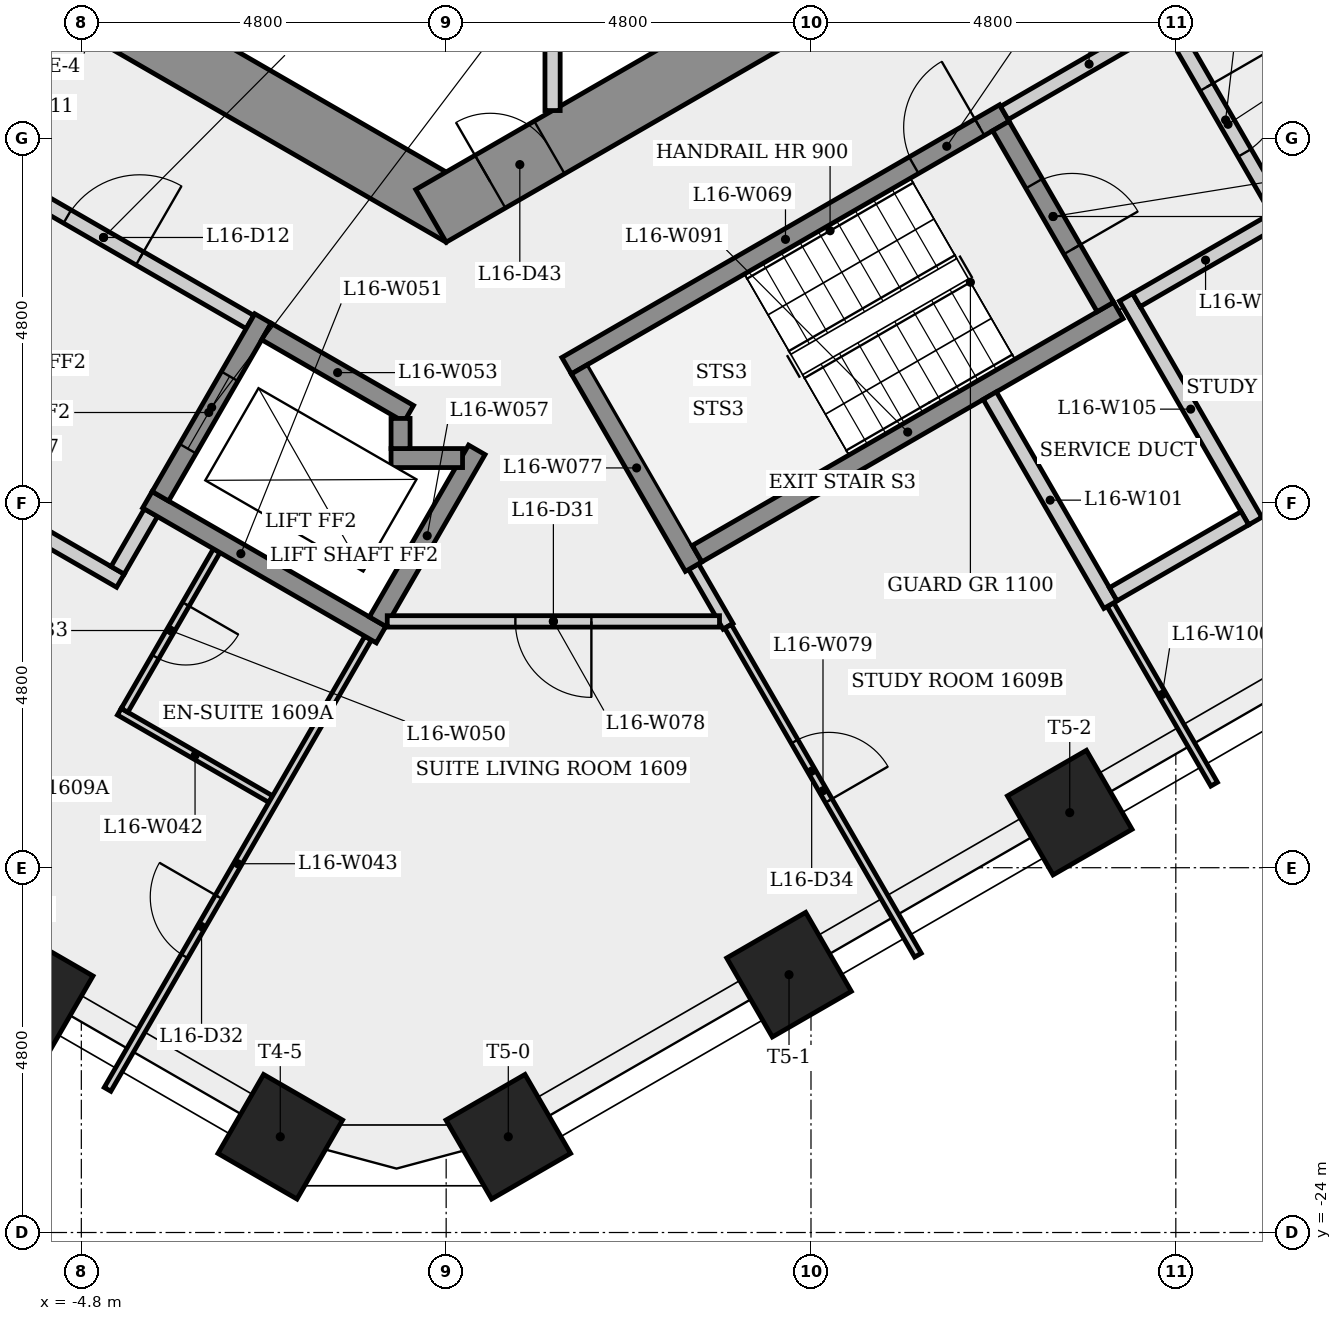
"""IFC4 building model, lengths in metres.
Left out: names, types, materials, properties, quantities, classifications, styles, units other than length and angle.
Written with IfcOpenShell. Run it as: python <this file> out.ifc"""

import sys

from ifc_helpers import new_model, si_unit, direction, frame, frame_2d, origin, origin_2d, place, context, subcontext, project, spatial, rectangle, extrude, element, fill, save


model = new_model("IFC4")
c1 = context("Model", 3, precision=1e-05, world=origin(), true_north=direction((0.0, 1.0)))
c2 = subcontext(c1, "Body", "Model", "MODEL_VIEW")
j1 = project(units=[si_unit("LENGTHUNIT", "METRE"), si_unit("PLANEANGLEUNIT", "RADIAN")], contexts=[c1])
p1 = place(None, origin())
s1 = spatial("IfcSite", under=j1, at=p1, CompositionType="ELEMENT")
p2 = place(p1, origin())
s2 = spatial("IfcBuilding", under=s1, at=p2, CompositionType="ELEMENT")
p3 = place(p2, frame((0.0, 0.0, 62.9)))
s3 = spatial("IfcBuildingStorey", under=s2, at=p3, CompositionType="ELEMENT", Elevation=62.9)
p4 = place(p3, frame((-9.3, -5.138, 0.0), z_axis=(0.0, 0.0, 1.0), x_axis=(0.866023993627, -0.500002442456, 0.0)))
e1 = element("IfcWall", 1, at=p4, inside=s3, PredefinedType="SHEAR", context=c2, shape_type="SweptSolid", body=[
    extrude(rectangle(XDim=10.97, YDim=0.8, at=frame_2d((5.485, 0.0))), origin(), (0.0, 0.0, 1.0), 3.4),
])
p5 = place(p4, frame((0.78, 0.0, 0.0)))
e2 = element("IfcOpeningElement", 2, at=p5, cuts=e1, PredefinedType="OPENING", context=c2, shape_type="SweptSolid", body=[
    extrude(rectangle(XDim=0.9, YDim=2.1, at=frame_2d((0.45, 1.05))), frame((0.0, 0.41, 0.0), z_axis=(0.0, -1.0, 0.0), x_axis=(1.0, 0.0, 0.0)), (0.0, 0.0, 1.0), 0.82),
])
p6 = place(p3, frame((-0.2, -10.623, 0.0), z_axis=(0.0, 0.0, 1.0), x_axis=(0.866023993627, 0.500002442456, 0.0)))
e3 = element("IfcWall", 3, at=p6, inside=s3, PredefinedType="SHEAR", context=c2, shape_type="SweptSolid", body=[
    extrude(rectangle(XDim=10.97, YDim=0.8, at=frame_2d((5.485, 0.0))), origin(), (0.0, 0.0, 1.0), 3.4),
])
p7 = place(p6, frame((0.9, 0.0, 0.0)))
e4 = element("IfcOpeningElement", 4, at=p7, cuts=e3, PredefinedType="OPENING", context=c2, shape_type="SweptSolid", body=[
    extrude(rectangle(XDim=0.9, YDim=2.1, at=frame_2d((0.45, 1.05))), frame((0.0, 0.41, 0.0), z_axis=(0.0, -1.0, 0.0), x_axis=(1.0, 0.0, 0.0)), (0.0, 0.0, 1.0), 0.82),
])
p8 = place(p6, frame((7.455, 0.0, 0.0)))
e5 = element("IfcOpeningElement", 5, at=p8, cuts=e3, PredefinedType="OPENING", context=c2, shape_type="SweptSolid", body=[
    extrude(rectangle(XDim=0.9, YDim=2.1, at=frame_2d((0.45, 1.05))), frame((0.0, 0.41, 0.0), z_axis=(0.0, -1.0, 0.0), x_axis=(1.0, 0.0, 0.0)), (0.0, 0.0, 1.0), 0.82),
])
for number, where, z_axis, x_axis in (
    (6, (-5.466, -20.844, 0.0), (0.0, 0.0, 1.0), (-0.5, -0.866, 0.0)),
    (7, (-2.182, -22.74, 0.0), (0.0, 0.0, 1.0), (-0.5, -0.866, 0.0)),
    (8, (0.818, -22.74, 0.0), (0.0, 0.0, 1.0), (0.5, -0.866, 0.0)),
    (9, (4.511, -20.607, 0.0), (0.0, 0.0, 1.0), (0.5, -0.866, 0.0)),
    (10, (8.204, -18.475, 0.0), (0.0, 0.0, 1.0), (0.5, -0.866, 0.0)),
):
    element("IfcColumn", number, at=place(p3, frame(where, z_axis=z_axis, x_axis=x_axis)), inside=s3, PredefinedType="COLUMN", context=c2, shape_type="SweptSolid", body=[
        extrude(rectangle(XDim=1.2, YDim=1.2, at=origin_2d()), origin(), (0.0, 0.0, 1.0), 3.4),
    ])
p9 = place(p3, frame((-8.356, -13.073, 0.0), z_axis=(0.0, 0.0, 1.0), x_axis=(0.866038532462, -0.499977259774, 0.0)))
e11 = element("IfcWall", 11, at=p9, inside=s3, PredefinedType="PARTITIONING", context=c2, shape_type="SweptSolid", body=[
    extrude(rectangle(XDim=4.7, YDim=0.2, at=frame_2d((2.35, 0.0))), origin(), (0.0, 0.0, 1.0), 3.0),
])
p10 = place(p3, frame((-6.435, -9.795, 0.0), z_axis=(0.0, 0.0, 1.0), x_axis=(0.866012907634, -0.500021643343, 0.0)))
e12 = element("IfcWall", 12, at=p10, inside=s3, PredefinedType="PARTITIONING", context=c2, shape_type="SweptSolid", body=[
    extrude(rectangle(XDim=4.45, YDim=0.2, at=frame_2d((2.225, 0.0))), origin(), (0.0, 0.0, 1.0), 3.0),
])
p11 = place(p10, frame((1.675, 0.0, 0.0)))
e13 = element("IfcOpeningElement", 13, at=p11, cuts=e12, PredefinedType="OPENING", context=c2, shape_type="SweptSolid", body=[
    extrude(rectangle(XDim=1.1, YDim=2.1, at=frame_2d((0.55, 1.05))), frame((0.0, 0.11, 0.0), z_axis=(0.0, -1.0, 0.0), x_axis=(1.0, 0.0, 0.0)), (0.0, 0.0, 1.0), 0.22),
])
p12 = place(p3, frame((-4.3, -17.147, 0.0), z_axis=(0.0, 0.0, 1.0), x_axis=(0.866053019151, -0.499952165731, 0.0)))
e14 = element("IfcWall", 14, at=p12, inside=s3, PredefinedType="PARTITIONING", context=c2, shape_type="SweptSolid", body=[
    extrude(rectangle(XDim=2.3, YDim=0.1, at=frame_2d((1.15, 0.0))), origin(), (0.0, 0.0, 1.0), 3.0),
])
p13 = place(p3, frame((-4.455, -22.116, 0.0), z_axis=(0.0, 0.0, 1.0), x_axis=(0.499984476993, 0.866034365811, 0.0)))
e15 = element("IfcWall", 15, at=p13, inside=s3, PredefinedType="PARTITIONING", context=c2, shape_type="SweptSolid", body=[
    extrude(rectangle(XDim=6.856, YDim=0.1, at=frame_2d((3.428, 0.0))), origin(), (0.0, 0.0, 1.0), 3.0),
])
p14 = place(p13, frame((2.023, 0.0, 0.0)))
e16 = element("IfcOpeningElement", 16, at=p14, cuts=e15, PredefinedType="OPENING", context=c2, shape_type="SweptSolid", body=[
    extrude(rectangle(XDim=0.9, YDim=2.1, at=frame_2d((0.45, 1.05))), frame((0.0, 0.06, 0.0), z_axis=(0.0, -1.0, 0.0), x_axis=(1.0, 0.0, 0.0)), (0.0, 0.0, 1.0), 0.12),
])
p15 = place(p3, frame((-3.885, -14.529, 0.0), z_axis=(0.0, 0.0, 1.0), x_axis=(-0.499859285417, -0.866106630146, 0.0)))
e17 = element("IfcWall", 17, at=p15, inside=s3, PredefinedType="PARTITIONING", context=c2, shape_type="SweptSolid", body=[
    extrude(rectangle(XDim=0.875, YDim=0.2, at=frame_2d((0.438, 0.0))), origin(), (0.0, 0.0, 1.0), 3.0),
])
p16 = place(p3, frame((-3.019, -15.029, 0.0), z_axis=(0.0, 0.0, 1.0), x_axis=(-0.499972286653, -0.866041403502, 0.0)))
e18 = element("IfcWall", 18, at=p16, inside=s3, PredefinedType="PARTITIONING", context=c2, shape_type="SweptSolid", body=[
    extrude(rectangle(XDim=2.425, YDim=0.1, at=frame_2d((1.212, 0.0))), origin(), (0.0, 0.0, 1.0), 3.0),
])
p17 = place(p16, frame((0.812, 0.0, 0.0)))
e19 = element("IfcOpeningElement", 19, at=p17, cuts=e18, PredefinedType="OPENING", context=c2, shape_type="SweptSolid", body=[
    extrude(rectangle(XDim=0.8, YDim=2.1, at=frame_2d((0.4, 1.05))), frame((0.0, 0.06, 0.0), z_axis=(0.0, -1.0, 0.0), x_axis=(1.0, 0.0, 0.0)), (0.0, 0.0, 1.0), 0.12),
])
p18 = place(p3, frame((-3.931, -14.358, 0.0), z_axis=(0.0, 0.0, 1.0), x_axis=(0.8660424351, -0.499970499736, 0.0)))
e20 = element("IfcWall", 20, at=p18, inside=s3, PredefinedType="SHEAR", context=c2, shape_type="SweptSolid", body=[
    extrude(rectangle(XDim=3.55, YDim=0.25, at=frame_2d((1.775, 0.0))), origin(), (0.0, 0.0, 1.0), 3.0),
])
p19 = place(p3, frame((-2.41, -11.974, 0.0), z_axis=(0.0, 0.0, 1.0), x_axis=(-0.50000943426, -0.866019956843, 0.0)))
e21 = element("IfcWall", 21, at=p19, inside=s3, PredefinedType="SHEAR", context=c2, shape_type="SweptSolid", body=[
    extrude(rectangle(XDim=2.7, YDim=0.25, at=frame_2d((1.35, 0.0))), origin(), (0.0, 0.0, 1.0), 3.0),
])
p20 = place(p19, frame((0.877, 0.0, 0.0)))
e22 = element("IfcOpeningElement", 22, at=p20, cuts=e21, PredefinedType="OPENING", context=c2, shape_type="SweptSolid", body=[
    extrude(rectangle(XDim=1.1, YDim=2.1, at=frame_2d((0.55, 1.05))), frame((0.0, 0.135, 0.0), z_axis=(0.0, -1.0, 0.0), x_axis=(1.0, 0.0, 0.0)), (0.0, 0.0, 1.0), 0.27),
])
p21 = place(p3, frame((-2.364, -12.145, 0.0), z_axis=(0.0, 0.0, 1.0), x_axis=(0.86603892542, -0.499976579108, 0.0)))
e23 = element("IfcWall", 23, at=p21, inside=s3, PredefinedType="SHEAR", context=c2, shape_type="SweptSolid", body=[
    extrude(rectangle(XDim=2.162, YDim=0.25, at=frame_2d((1.081, 0.0))), origin(), (0.0, 0.0, 1.0), 3.0),
])
p22 = place(p3, frame((-0.902, -15.962, 0.0), z_axis=(0.0, 0.0, 1.0), x_axis=(0.499981517636, 0.866036074319, 0.0)))
e24 = element("IfcWall", 24, at=p22, inside=s3, PredefinedType="SHEAR", context=c2, shape_type="SweptSolid", body=[
    extrude(rectangle(XDim=2.61, YDim=0.25, at=frame_2d((1.305, 0.0))), origin(), (0.0, 0.0, 1.0), 3.0),
])
p23 = place(p3, frame((-0.725, -13.81, 0.0), z_axis=(0.0, 0.0, 1.0), x_axis=(1.0, 0.0, 0.0)))
e25 = element("IfcWall", 25, at=p23, inside=s3, PredefinedType="SHEAR", context=c2, shape_type="SweptSolid", body=[
    extrude(rectangle(XDim=0.941, YDim=0.25, at=frame_2d((0.47, 0.0))), origin(), (0.0, 0.0, 1.0), 3.4),
])
p24 = place(p3, frame((-0.6, -13.289, 0.0), z_axis=(0.0, 0.0, 1.0), x_axis=(0.0, -1.0, 0.0)))
e26 = element("IfcWall", 26, at=p24, inside=s3, PredefinedType="SHEAR", context=c2, shape_type="SweptSolid", body=[
    extrude(rectangle(XDim=0.396, YDim=0.25, at=frame_2d((0.198, 0.0))), origin(), (0.0, 0.0, 1.0), 3.4),
])
p25 = place(p3, frame((1.4, -5.275, 0.0), z_axis=(0.0, 0.0, 1.0), x_axis=(0.0, -1.0, 0.0)))
e27 = element("IfcWall", 27, at=p25, inside=s3, PredefinedType="PARTITIONING", context=c2, shape_type="SweptSolid", body=[
    extrude(rectangle(XDim=3.963, YDim=0.2, at=frame_2d((1.981, 0.0))), origin(), (0.0, 0.0, 1.0), 3.0),
])
p26 = place(p3, frame((1.585, -12.595, 0.0), z_axis=(0.0, 0.0, 1.0), x_axis=(0.866036417653, 0.499980922934, 0.0)))
e28 = element("IfcWall", 28, at=p26, inside=s3, PredefinedType="SHEAR", context=c2, shape_type="SweptSolid", body=[
    extrude(rectangle(XDim=6.65, YDim=0.25, at=frame_2d((3.325, 0.0))), origin(), (0.0, 0.0, 1.0), 3.0),
])
p27 = place(p26, frame((5.275, 0.0, 0.0)))
e29 = element("IfcOpeningElement", 29, at=p27, cuts=e28, PredefinedType="OPENING", context=c2, shape_type="SweptSolid", body=[
    extrude(rectangle(XDim=1.0, YDim=2.1, at=frame_2d((0.5, 1.05))), frame((0.0, 0.135, 0.0), z_axis=(0.0, -1.0, 0.0), x_axis=(1.0, 0.0, 0.0)), (0.0, 0.0, 1.0), 0.27),
])
p28 = place(p3, frame((3.256, -15.239, 0.0), z_axis=(0.0, 0.0, 1.0), x_axis=(0.500048779063, -0.865997239347, 0.0)))
e30 = element("IfcWall", 30, at=p28, inside=s3, PredefinedType="PARTITIONING", context=c2, shape_type="SweptSolid", body=[
    extrude(rectangle(XDim=0.907, YDim=0.15, at=frame_2d((0.453, 0.0))), origin(), (0.0, 0.0, 1.0), 3.0),
])
p29 = place(p3, frame((3.256, -15.239, 0.0), z_axis=(0.0, 0.0, 1.0), x_axis=(-0.50002537861, 0.866010750942, 0.0)))
e31 = element("IfcWall", 31, at=p29, inside=s3, PredefinedType="SHEAR", context=c2, shape_type="SweptSolid", body=[
    extrude(rectangle(XDim=3.0, YDim=0.25, at=frame_2d((1.5, 0.0))), origin(), (0.0, 0.0, 1.0), 3.0),
])
p30 = place(p3, frame((3.596, -15.959, 0.0), z_axis=(0.0, 0.0, 1.0), x_axis=(-1.0, 0.0, 0.0)))
e32 = element("IfcWall", 32, at=p30, inside=s3, PredefinedType="PARTITIONING", context=c2, shape_type="SweptSolid", body=[
    extrude(rectangle(XDim=4.372, YDim=0.15, at=frame_2d((2.186, 0.0))), origin(), (0.0, 0.0, 1.0), 3.0),
])
p31 = place(p30, frame((1.686, 0.0, 0.0)))
e33 = element("IfcOpeningElement", 33, at=p31, cuts=e32, PredefinedType="OPENING", context=c2, shape_type="SweptSolid", body=[
    extrude(rectangle(XDim=1.0, YDim=2.1, at=frame_2d((0.5, 1.05))), frame((0.0, 0.085, 0.0), z_axis=(0.0, -1.0, 0.0), x_axis=(1.0, 0.0, 0.0)), (0.0, 0.0, 1.0), 0.17),
])
p32 = place(p3, frame((3.709, -16.024, 0.0), z_axis=(0.0, 0.0, 1.0), x_axis=(0.499986116641, -0.866033419197, 0.0)))
e34 = element("IfcWall", 34, at=p32, inside=s3, PredefinedType="PARTITIONING", context=c2, shape_type="SweptSolid", body=[
    extrude(rectangle(XDim=4.996, YDim=0.1, at=frame_2d((2.498, 0.0))), origin(), (0.0, 0.0, 1.0), 3.0),
])
p33 = place(p32, frame((1.75, 0.0, 0.0)))
e35 = element("IfcOpeningElement", 35, at=p33, cuts=e34, PredefinedType="OPENING", context=c2, shape_type="SweptSolid", body=[
    extrude(rectangle(XDim=0.9, YDim=2.1, at=frame_2d((0.45, 1.05))), frame((0.0, 0.06, 0.0), z_axis=(0.0, -1.0, 0.0), x_axis=(1.0, 0.0, 0.0)), (0.0, 0.0, 1.0), 0.12),
])
p34 = place(p3, frame((3.301, -15.068, 0.0), z_axis=(0.0, 0.0, 1.0), x_axis=(0.866035036182, 0.499983315828, 0.0)))
e36 = element("IfcWall", 36, at=p34, inside=s3, PredefinedType="SHEAR", context=c2, shape_type="SweptSolid", body=[
    extrude(rectangle(XDim=6.4, YDim=0.25, at=frame_2d((3.2, 0.0))), origin(), (0.0, 0.0, 1.0), 3.0),
])
p35 = place(p3, frame((7.298, -9.441, 0.0), z_axis=(0.0, 0.0, 1.0), x_axis=(0.500034990121, -0.866005201286, 0.0)))
e37 = element("IfcWall", 37, at=p35, inside=s3, PredefinedType="SHEAR", context=c2, shape_type="SweptSolid", body=[
    extrude(rectangle(XDim=2.75, YDim=0.25, at=frame_2d((1.375, 0.0))), origin(), (0.0, 0.0, 1.0), 3.0),
])
p36 = place(p35, frame((0.875, 0.0, 0.0)))
e38 = element("IfcOpeningElement", 38, at=p36, cuts=e37, PredefinedType="OPENING", context=c2, shape_type="SweptSolid", body=[
    extrude(rectangle(XDim=1.0, YDim=2.1, at=frame_2d((0.5, 1.05))), frame((0.0, 0.135, 0.0), z_axis=(0.0, -1.0, 0.0), x_axis=(1.0, 0.0, 0.0)), (0.0, 0.0, 1.0), 0.27),
])
p37 = place(p3, frame((7.344, -9.27, 0.0), z_axis=(0.0, 0.0, 1.0), x_axis=(0.866005588531, 0.500034319456, 0.0)))
e39 = element("IfcWall", 39, at=p37, inside=s3, PredefinedType="PARTITIONING", context=c2, shape_type="SweptSolid", body=[
    extrude(rectangle(XDim=2.575, YDim=0.2, at=frame_2d((1.288, 0.0))), origin(), (0.0, 0.0, 1.0), 3.0),
])
p38 = place(p3, frame((8.74, -15.738, 0.0), z_axis=(0.0, 0.0, 1.0), x_axis=(0.499998754593, -0.86602612282, 0.0)))
e40 = element("IfcWall", 40, at=p38, inside=s3, PredefinedType="PARTITIONING", context=c2, shape_type="SweptSolid", body=[
    extrude(rectangle(XDim=2.728, YDim=0.1, at=frame_2d((1.364, 0.0))), origin(), (0.0, 0.0, 1.0), 3.0),
])
p39 = place(p3, frame((8.74, -15.739, 0.0), z_axis=(0.0, 0.0, 1.0), x_axis=(-0.500017526161, 0.866015284814, 0.0)))
e41 = element("IfcWall", 41, at=p39, inside=s3, PredefinedType="PLUMBINGWALL", context=c2, shape_type="SweptSolid", body=[
    extrude(rectangle(XDim=3.175, YDim=0.2, at=frame_2d((1.588, 0.0))), origin(), (0.0, 0.0, 1.0), 3.0),
])
p40 = place(p3, frame((8.945, -11.694, 0.0), z_axis=(0.0, 0.0, 1.0), x_axis=(0.500062241894, -0.865989465428, 0.0)))
e42 = element("IfcWall", 42, at=p40, inside=s3, PredefinedType="PLUMBINGWALL", context=c2, shape_type="SweptSolid", body=[
    extrude(rectangle(XDim=3.4, YDim=0.2, at=frame_2d((1.7, 0.0))), origin(), (0.0, 0.0, 1.0), 3.0),
])
p41 = place(p3, frame((9.537, -8.119, 0.0), z_axis=(0.0, 0.0, 1.0), x_axis=(0.499990139034, -0.866031096941, 0.0)))
e43 = element("IfcWall", 43, at=p41, inside=s3, PredefinedType="PARTITIONING", context=c2, shape_type="SweptSolid", body=[
    extrude(rectangle(XDim=3.0, YDim=0.2, at=frame_2d((1.5, 0.0))), origin(), (0.0, 0.0, 1.0), 3.0),
])
p42 = place(p41, frame((0.935, 0.0, 0.0)))
e44 = element("IfcOpeningElement", 44, at=p42, cuts=e43, PredefinedType="OPENING", context=c2, shape_type="SweptSolid", body=[
    extrude(rectangle(XDim=1.0, YDim=2.1, at=frame_2d((0.5, 1.05))), frame((0.0, 0.11, 0.0), z_axis=(0.0, -1.0, 0.0), x_axis=(1.0, 0.0, 0.0)), (0.0, 0.0, 1.0), 0.22),
])
p43 = place(p3, frame((10.509, -14.602, 0.0), z_axis=(0.0, 0.0, 1.0), x_axis=(-0.866010750942, -0.50002537861, 0.0)))
e45 = element("IfcWall", 45, at=p43, inside=s3, PredefinedType="PLUMBINGWALL", context=c2, shape_type="SweptSolid", body=[
    extrude(rectangle(XDim=2.0, YDim=0.2, at=frame_2d((1.0, 0.0))), origin(), (0.0, 0.0, 1.0), 3.0),
])
p44 = place(p3, frame((10.901, -10.681, 0.0), z_axis=(0.0, 0.0, 1.0), x_axis=(-0.866009402589, -0.500027713859, 0.0)))
e46 = element("IfcWall", 46, at=p44, inside=s3, PredefinedType="PARTITIONING", context=c2, shape_type="SweptSolid", body=[
    extrude(rectangle(XDim=2.1, YDim=0.2, at=frame_2d((1.05, 0.0))), origin(), (0.0, 0.0, 1.0), 3.0),
])
p45 = place(p11, origin())
e47 = element("IfcDoor", 47, at=p45, inside=s3, OperationType="SINGLE_SWING_RIGHT", PredefinedType="DOOR", context=c2, shape_type="SweptSolid", body=[
    extrude(rectangle(XDim=1.1, YDim=2.1, at=frame_2d((0.55, 1.05))), frame((0.0, 0.025, 0.0), z_axis=(0.0, -1.0, 0.0), x_axis=(1.0, 0.0, 0.0)), (0.0, 0.0, 1.0), 0.05),
])
fill(e13, e47)
p46 = place(p20, origin())
e48 = element("IfcDoor", 48, at=p46, inside=s3, OperationType="SLIDING_TO_LEFT", PredefinedType="DOOR", context=c2, shape_type="SweptSolid", body=[
    extrude(rectangle(XDim=1.1, YDim=2.1, at=frame_2d((0.55, 1.05))), frame((0.0, 0.025, 0.0), z_axis=(0.0, -1.0, 0.0), x_axis=(1.0, 0.0, 0.0)), (0.0, 0.0, 1.0), 0.05),
])
fill(e22, e48)
p47 = place(p27, origin())
e49 = element("IfcDoor", 49, at=p47, inside=s3, OperationType="SINGLE_SWING_RIGHT", PredefinedType="DOOR", context=c2, shape_type="SweptSolid", body=[
    extrude(rectangle(XDim=1.0, YDim=2.1, at=frame_2d((0.5, 1.05))), frame((0.0, 0.025, 0.0), z_axis=(0.0, -1.0, 0.0), x_axis=(1.0, 0.0, 0.0)), (0.0, 0.0, 1.0), 0.05),
])
fill(e29, e49)
p48 = place(p42, origin())
e50 = element("IfcDoor", 50, at=p48, inside=s3, OperationType="SINGLE_SWING_LEFT", PredefinedType="DOOR", context=c2, shape_type="SweptSolid", body=[
    extrude(rectangle(XDim=1.0, YDim=2.1, at=frame_2d((0.5, 1.05))), frame((0.0, 0.025, 0.0), z_axis=(0.0, -1.0, 0.0), x_axis=(1.0, 0.0, 0.0)), (0.0, 0.0, 1.0), 0.05),
])
fill(e44, e50)
p49 = place(p36, origin())
e51 = element("IfcDoor", 51, at=p49, inside=s3, OperationType="SINGLE_SWING_RIGHT", PredefinedType="DOOR", context=c2, shape_type="SweptSolid", body=[
    extrude(rectangle(XDim=1.0, YDim=2.1, at=frame_2d((0.5, 1.05))), frame((0.0, 0.025, 0.0), z_axis=(0.0, -1.0, 0.0), x_axis=(1.0, 0.0, 0.0)), (0.0, 0.0, 1.0), 0.05),
])
fill(e38, e51)
p50 = place(p31, origin())
e52 = element("IfcDoor", 52, at=p50, inside=s3, OperationType="SINGLE_SWING_LEFT", PredefinedType="DOOR", context=c2, shape_type="SweptSolid", body=[
    extrude(rectangle(XDim=1.0, YDim=2.1, at=frame_2d((0.5, 1.05))), frame((0.0, 0.025, 0.0), z_axis=(0.0, -1.0, 0.0), x_axis=(1.0, 0.0, 0.0)), (0.0, 0.0, 1.0), 0.05),
])
fill(e33, e52)
p51 = place(p14, origin())
e53 = element("IfcDoor", 53, at=p51, inside=s3, OperationType="SINGLE_SWING_RIGHT", PredefinedType="DOOR", context=c2, shape_type="SweptSolid", body=[
    extrude(rectangle(XDim=0.9, YDim=2.1, at=frame_2d((0.45, 1.05))), frame((0.0, 0.025, 0.0), z_axis=(0.0, -1.0, 0.0), x_axis=(1.0, 0.0, 0.0)), (0.0, 0.0, 1.0), 0.05),
])
fill(e16, e53)
p52 = place(p17, origin())
e54 = element("IfcDoor", 54, at=p52, inside=s3, OperationType="SINGLE_SWING_LEFT", PredefinedType="DOOR", context=c2, shape_type="SweptSolid", body=[
    extrude(rectangle(XDim=0.8, YDim=2.1, at=frame_2d((0.4, 1.05))), frame((0.0, 0.025, 0.0), z_axis=(0.0, -1.0, 0.0), x_axis=(1.0, 0.0, 0.0)), (0.0, 0.0, 1.0), 0.05),
])
fill(e19, e54)
p53 = place(p33, origin())
e55 = element("IfcDoor", 55, at=p53, inside=s3, OperationType="SINGLE_SWING_RIGHT", PredefinedType="DOOR", context=c2, shape_type="SweptSolid", body=[
    extrude(rectangle(XDim=0.9, YDim=2.1, at=frame_2d((0.45, 1.05))), frame((0.0, 0.025, 0.0), z_axis=(0.0, -1.0, 0.0), x_axis=(1.0, 0.0, 0.0)), (0.0, 0.0, 1.0), 0.05),
])
fill(e35, e55)
p54 = place(p7, origin())
e56 = element("IfcDoor", 56, at=p54, inside=s3, OperationType="SINGLE_SWING_LEFT", PredefinedType="DOOR", context=c2, shape_type="SweptSolid", body=[
    extrude(rectangle(XDim=0.9, YDim=2.1, at=frame_2d((0.45, 1.05))), frame((0.0, 0.025, 0.0), z_axis=(0.0, -1.0, 0.0), x_axis=(1.0, 0.0, 0.0)), (0.0, 0.0, 1.0), 0.05),
])
fill(e4, e56)
save(model, sys.argv[1])
